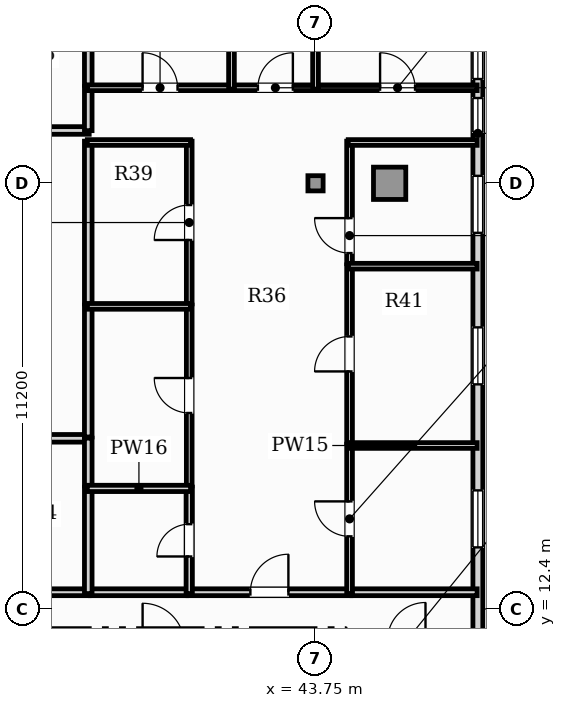
"""IFC4 building model, lengths in metres.
Left out: names, types, materials, properties, quantities, classifications, styles, units other than length and angle.
Written with IfcOpenShell. Run it as: python <this file> out.ifc"""

import sys

from ifc_helpers import new_model, si_unit, direction, frame, frame_2d, origin, origin_2d, place, context, subcontext, project, spatial, rectangle, hollow_rectangle, extrude, element, fill, save


model = new_model("IFC4")
c1 = context("Model", 3, precision=1e-05, world=origin(), true_north=direction((0.0, 1.0)))
c2 = subcontext(c1, "Body", "Model", "MODEL_VIEW")
j1 = project(units=[si_unit("LENGTHUNIT", "METRE"), si_unit("PLANEANGLEUNIT", "RADIAN")], contexts=[c1])
p1 = place(None, origin())
s1 = spatial("IfcSite", under=j1, at=p1, CompositionType="ELEMENT")
p2 = place(p1, origin())
s2 = spatial("IfcBuilding", under=s1, at=p2, CompositionType="ELEMENT")
p3 = place(p2, frame((0.0, 0.0, 337.5)))
s3 = spatial("IfcBuildingStorey", under=s2, at=p3, CompositionType="ELEMENT", Elevation=337.5)
p4 = place(p3, frame((45.7, 23.6, 0.0), z_axis=(0.0, 0.0, 1.0), x_axis=(1.0, 0.0, 0.0)))
e1 = element("IfcColumn", 1, at=p4, inside=s3, PredefinedType="USERDEFINED", context=c2, shape_type="SweptSolid", body=[
    extrude(hollow_rectangle(XDim=0.85, YDim=0.85, WallThickness=0.05, at=origin_2d()), origin(), (0.0, 0.0, 1.0), 3.85),
])
p5 = place(p3, frame((43.75, 23.6, 0.0), z_axis=(0.0, 0.0, 1.0), x_axis=(1.0, 0.0, 0.0)))
e2 = element("IfcColumn", 2, at=p5, inside=s3, PredefinedType="COLUMN", context=c2, shape_type="SweptSolid", body=[
    extrude(hollow_rectangle(XDim=0.4, YDim=0.4, WallThickness=0.02, at=origin_2d()), origin(), (0.0, 0.0, 1.0), 3.85),
])
p6 = place(p3, frame((48.021, 3.24, 0.0), z_axis=(0.0, 0.0, 1.0), x_axis=(0.0, 1.0, 0.0)))
e3 = element("IfcWall", 3, at=p6, inside=s3, PredefinedType="SOLIDWALL", context=c2, shape_type="SweptSolid", body=[
    extrude(rectangle(XDim=25.374, YDim=0.26, at=frame_2d((12.687, 0.0))), origin(), (0.0, 0.0, 1.0), 3.63),
])
p7 = place(p6, frame((21.704, 0.0, 0.95)))
e4 = element("IfcOpeningElement", 4, at=p7, cuts=e3, PredefinedType="OPENING", context=c2, shape_type="SweptSolid", body=[
    extrude(rectangle(XDim=0.9, YDim=1.5, at=frame_2d((0.45, 0.75))), frame((0.0, 0.14, 0.0), z_axis=(0.0, -1.0, 0.0), x_axis=(1.0, 0.0, 0.0)), (0.0, 0.0, 1.0), 0.28),
])
p8 = place(p6, frame((10.781, 0.0, 0.9)))
e5 = element("IfcOpeningElement", 5, at=p8, cuts=e3, PredefinedType="OPENING", context=c2, shape_type="SweptSolid", body=[
    extrude(rectangle(XDim=1.5, YDim=1.95, at=frame_2d((0.75, 0.975))), frame((0.0, 0.14, 0.0), z_axis=(0.0, -1.0, 0.0), x_axis=(1.0, 0.0, 0.0)), (0.0, 0.0, 1.0), 0.28),
])
p9 = place(p6, frame((15.07, 0.0, 0.9)))
e6 = element("IfcOpeningElement", 6, at=p9, cuts=e3, PredefinedType="OPENING", context=c2, shape_type="SweptSolid", body=[
    extrude(rectangle(XDim=1.5, YDim=1.95, at=frame_2d((0.75, 0.975))), frame((0.0, 0.14, 0.0), z_axis=(0.0, -1.0, 0.0), x_axis=(1.0, 0.0, 0.0)), (0.0, 0.0, 1.0), 0.28),
])
p10 = place(p6, frame((19.056, 0.0, 0.9)))
e7 = element("IfcOpeningElement", 7, at=p10, cuts=e3, PredefinedType="OPENING", context=c2, shape_type="SweptSolid", body=[
    extrude(rectangle(XDim=1.5, YDim=1.95, at=frame_2d((0.75, 0.975))), frame((0.0, 0.14, 0.0), z_axis=(0.0, -1.0, 0.0), x_axis=(1.0, 0.0, 0.0)), (0.0, 0.0, 1.0), 0.28),
])
p11 = place(p6, frame((23.104, 0.0, 0.9)))
e8 = element("IfcOpeningElement", 8, at=p11, cuts=e3, PredefinedType="OPENING", context=c2, shape_type="SweptSolid", body=[
    extrude(rectangle(XDim=1.5, YDim=1.95, at=frame_2d((0.75, 0.975))), frame((0.0, 0.14, 0.0), z_axis=(0.0, -1.0, 0.0), x_axis=(1.0, 0.0, 0.0)), (0.0, 0.0, 1.0), 0.28),
])
p12 = place(p3, frame((34.149, 12.84, 0.0), z_axis=(0.0, 0.0, 1.0), x_axis=(1.0, 0.0, 0.0)))
e9 = element("IfcWall", 9, at=p12, inside=s3, PredefinedType="PARTITIONING", context=c2, shape_type="SweptSolid", body=[
    extrude(rectangle(XDim=3.646, YDim=0.18, at=frame_2d((1.823, 0.0))), origin(), (0.0, 0.0, 1.0), 3.63),
])
p13 = place(p12, frame((1.323, 0.0, 0.0)))
e10 = element("IfcOpeningElement", 10, at=p13, cuts=e9, PredefinedType="OPENING", context=c2, shape_type="SweptSolid", body=[
    extrude(rectangle(XDim=1.0, YDim=2.15, at=frame_2d((0.5, 1.075))), frame((0.0, 0.1, 0.0), z_axis=(0.0, -1.0, 0.0), x_axis=(1.0, 0.0, 0.0)), (0.0, 0.0, 1.0), 0.2),
])
p14 = place(p3, frame((40.392, 12.84, 0.0), z_axis=(0.0, 0.0, 1.0), x_axis=(1.0, 0.0, 0.0)))
e11 = element("IfcWall", 11, at=p14, inside=s3, PredefinedType="PARTITIONING", context=c2, shape_type="SweptSolid", body=[
    extrude(rectangle(XDim=4.289, YDim=0.18, at=frame_2d((2.144, 0.0))), origin(), (0.0, 0.0, 1.0), 3.63),
])
p15 = place(p14, frame((1.644, 0.0, 0.0)))
e12 = element("IfcOpeningElement", 12, at=p15, cuts=e11, PredefinedType="OPENING", context=c2, shape_type="SweptSolid", body=[
    extrude(rectangle(XDim=1.0, YDim=2.15, at=frame_2d((0.5, 1.075))), frame((0.0, 0.1, 0.0), z_axis=(0.0, -1.0, 0.0), x_axis=(1.0, 0.0, 0.0)), (0.0, 0.0, 1.0), 0.2),
])
p16 = place(p3, frame((37.825, 12.84, 0.0), z_axis=(0.0, 0.0, 1.0), x_axis=(1.0, 0.0, 0.0)))
e13 = element("IfcWall", 13, at=p16, inside=s3, PredefinedType="PARTITIONING", context=c2, shape_type="SweptSolid", body=[
    extrude(rectangle(XDim=2.537, YDim=0.18, at=frame_2d((1.269, 0.0))), origin(), (0.0, 0.0, 1.0), 3.63),
])
p17 = place(p3, frame((44.71, 12.84, 0.0), z_axis=(0.0, 0.0, 1.0), x_axis=(1.0, 0.0, 0.0)))
e14 = element("IfcWall", 14, at=p17, inside=s3, PredefinedType="PARTITIONING", context=c2, shape_type="SweptSolid", body=[
    extrude(rectangle(XDim=3.292, YDim=0.18, at=frame_2d((1.646, 0.0))), origin(), (0.0, 0.0, 1.0), 3.63),
])
p18 = place(p3, frame((34.148, 16.89, 0.0), z_axis=(0.0, 0.0, 1.0), x_axis=(1.0, 0.0, 0.0)))
e15 = element("IfcWall", 15, at=p18, inside=s3, PredefinedType="PARTITIONING", context=c2, shape_type="SweptSolid", body=[
    extrude(rectangle(XDim=3.647, YDim=0.2, at=frame_2d((1.823, 0.0))), origin(), (0.0, 0.0, 1.0), 3.63),
])
p19 = place(p18, frame((1.364, 0.0, 0.0)))
e16 = element("IfcOpeningElement", 16, at=p19, cuts=e15, PredefinedType="OPENING", context=c2, shape_type="SweptSolid", body=[
    extrude(rectangle(XDim=0.92, YDim=2.1, at=frame_2d((0.46, 1.05))), frame((0.0, 0.11, 0.0), z_axis=(0.0, -1.0, 0.0), x_axis=(1.0, 0.0, 0.0)), (0.0, 0.0, 1.0), 0.22),
])
p20 = place(p3, frame((37.77, 12.805, 0.0), z_axis=(0.0, 0.0, 1.0), x_axis=(0.0, 1.0, 0.0)))
e17 = element("IfcWall", 17, at=p20, inside=s3, PredefinedType="PARTITIONING", context=c2, shape_type="SweptSolid", body=[
    extrude(rectangle(XDim=2.802, YDim=0.2, at=frame_2d((1.401, 0.0))), origin(), (0.0, 0.0, 1.0), 3.63),
])
p21 = place(p3, frame((37.77, 15.637, 0.0), z_axis=(0.0, 0.0, 1.0), x_axis=(0.0, 1.0, 0.0)))
e18 = element("IfcWall", 18, at=p21, inside=s3, PredefinedType="PARTITIONING", context=c2, shape_type="SweptSolid", body=[
    extrude(rectangle(XDim=1.258, YDim=0.2, at=frame_2d((0.629, 0.0))), origin(), (0.0, 0.0, 1.0), 3.63),
])
p22 = place(p3, frame((34.149, 24.99, 0.0), z_axis=(0.0, 0.0, 1.0), x_axis=(1.0, 0.0, 0.0)))
e19 = element("IfcWall", 19, at=p22, inside=s3, PredefinedType="PARTITIONING", context=c2, shape_type="SweptSolid", body=[
    extrude(rectangle(XDim=3.646, YDim=0.2, at=frame_2d((1.823, 0.0))), origin(), (0.0, 0.0, 1.0), 3.63),
])
p23 = place(p22, frame((0.816, 0.0, 0.0)))
e20 = element("IfcOpeningElement", 20, at=p23, cuts=e19, PredefinedType="OPENING", context=c2, shape_type="SweptSolid", body=[
    extrude(rectangle(XDim=0.92, YDim=2.1, at=frame_2d((0.46, 1.05))), frame((0.0, 0.11, 0.0), z_axis=(0.0, -1.0, 0.0), x_axis=(1.0, 0.0, 0.0)), (0.0, 0.0, 1.0), 0.22),
])
p24 = place(p3, frame((37.77, 16.925, 0.0), z_axis=(0.0, 0.0, 1.0), x_axis=(0.0, 1.0, 0.0)))
e21 = element("IfcWall", 21, at=p24, inside=s3, PredefinedType="PARTITIONING", context=c2, shape_type="SweptSolid", body=[
    extrude(rectangle(XDim=3.472, YDim=0.2, at=frame_2d((1.736, 0.0))), origin(), (0.0, 0.0, 1.0), 3.63),
])
p25 = place(p3, frame((37.77, 20.427, 0.0), z_axis=(0.0, 0.0, 1.0), x_axis=(0.0, 1.0, 0.0)))
e22 = element("IfcWall", 22, at=p25, inside=s3, PredefinedType="PARTITIONING", context=c2, shape_type="SweptSolid", body=[
    extrude(rectangle(XDim=4.282, YDim=0.2, at=frame_2d((2.141, 0.0))), origin(), (0.0, 0.0, 1.0), 3.63),
])
p26 = place(p3, frame((37.77, 24.985, 0.0), z_axis=(0.0, 0.0, 1.0), x_axis=(0.0, 1.0, 0.0)))
e23 = element("IfcWall", 23, at=p26, inside=s3, PredefinedType="PARTITIONING", context=c2, shape_type="SweptSolid", body=[
    extrude(rectangle(XDim=1.164, YDim=0.2, at=frame_2d((0.582, 0.0))), origin(), (0.0, 0.0, 1.0), 3.63),
])
p27 = place(p3, frame((37.77, 26.179, 0.0), z_axis=(0.0, 0.0, 1.0), x_axis=(0.0, 1.0, 0.0)))
e24 = element("IfcWall", 24, at=p27, inside=s3, PredefinedType="PARTITIONING", context=c2, shape_type="SweptSolid", body=[
    extrude(rectangle(XDim=5.526, YDim=0.2, at=frame_2d((2.763, 0.0))), origin(), (0.0, 0.0, 1.0), 3.63),
])
p28 = place(p3, frame((40.427, 12.805, 0.0), z_axis=(0.0, 0.0, 1.0), x_axis=(0.0, 1.0, 0.0)))
e25 = element("IfcWall", 25, at=p28, inside=s3, PredefinedType="PLUMBINGWALL", context=c2, shape_type="SweptSolid", body=[
    extrude(rectangle(XDim=2.802, YDim=0.165, at=frame_2d((1.401, 0.0))), origin(), (0.0, 0.0, 1.0), 3.63),
])
p29 = place(p28, frame((0.976, 0.0, 0.0)))
e26 = element("IfcOpeningElement", 26, at=p29, cuts=e25, PredefinedType="OPENING", context=c2, shape_type="SweptSolid", body=[
    extrude(rectangle(XDim=0.85, YDim=2.1, at=frame_2d((0.425, 1.05))), frame((0.0, 0.093, 0.0), z_axis=(0.0, -1.0, 0.0), x_axis=(1.0, 0.0, 0.0)), (0.0, 0.0, 1.0), 0.185),
])
p30 = place(p3, frame((40.427, 15.637, 0.0), z_axis=(0.0, 0.0, 1.0), x_axis=(0.0, 1.0, 0.0)))
e27 = element("IfcWall", 27, at=p30, inside=s3, PredefinedType="PARTITIONING", context=c2, shape_type="SweptSolid", body=[
    extrude(rectangle(XDim=4.76, YDim=0.15, at=frame_2d((2.38, 0.0))), origin(), (0.0, 0.0, 1.0), 3.63),
])
p31 = place(p30, frame((1.92, 0.0, 0.0)))
e28 = element("IfcOpeningElement", 28, at=p31, cuts=e27, PredefinedType="OPENING", context=c2, shape_type="SweptSolid", body=[
    extrude(rectangle(XDim=0.92, YDim=2.1, at=frame_2d((0.46, 1.05))), frame((0.0, 0.085, 0.0), z_axis=(0.0, -1.0, 0.0), x_axis=(1.0, 0.0, 0.0)), (0.0, 0.0, 1.0), 0.17),
])
p32 = place(p3, frame((40.427, 20.427, 0.0), z_axis=(0.0, 0.0, 1.0), x_axis=(0.0, 1.0, 0.0)))
e29 = element("IfcWall", 29, at=p32, inside=s3, PredefinedType="PARTITIONING", context=c2, shape_type="SweptSolid", body=[
    extrude(rectangle(XDim=4.282, YDim=0.15, at=frame_2d((2.141, 0.0))), origin(), (0.0, 0.0, 1.0), 3.63),
])
p33 = place(p32, frame((1.681, 0.0, 0.0)))
e30 = element("IfcOpeningElement", 30, at=p33, cuts=e29, PredefinedType="OPENING", context=c2, shape_type="SweptSolid", body=[
    extrude(rectangle(XDim=0.92, YDim=2.1, at=frame_2d((0.46, 1.05))), frame((0.0, 0.085, 0.0), z_axis=(0.0, -1.0, 0.0), x_axis=(1.0, 0.0, 0.0)), (0.0, 0.0, 1.0), 0.17),
])
p34 = place(p3, frame((37.745, 24.674, 0.0), z_axis=(0.0, 0.0, 1.0), x_axis=(1.0, 0.0, 0.0)))
e31 = element("IfcWall", 31, at=p34, inside=s3, PredefinedType="PARTITIONING", context=c2, shape_type="SweptSolid", body=[
    extrude(rectangle(XDim=2.717, YDim=0.15, at=frame_2d((1.358, 0.0))), origin(), (0.0, 0.0, 1.0), 3.63),
])
p35 = place(p3, frame((44.646, 12.805, 0.0), z_axis=(0.0, 0.0, 1.0), x_axis=(0.0, 1.0, 0.0)))
e32 = element("IfcWall", 32, at=p35, inside=s3, PredefinedType="PARTITIONING", context=c2, shape_type="SweptSolid", body=[
    extrude(rectangle(XDim=3.931, YDim=0.15, at=frame_2d((1.965, 0.0))), origin(), (0.0, 0.0, 1.0), 3.63),
])
p36 = place(p35, frame((1.506, 0.0, 0.0)))
e33 = element("IfcOpeningElement", 33, at=p36, cuts=e32, PredefinedType="OPENING", context=c2, shape_type="SweptSolid", body=[
    extrude(rectangle(XDim=0.92, YDim=2.1, at=frame_2d((0.46, 1.05))), frame((0.0, 0.085, 0.0), z_axis=(0.0, -1.0, 0.0), x_axis=(1.0, 0.0, 0.0)), (0.0, 0.0, 1.0), 0.17),
])
p37 = place(p3, frame((44.646, 16.766, 0.0), z_axis=(0.0, 0.0, 1.0), x_axis=(0.0, 1.0, 0.0)))
e34 = element("IfcWall", 34, at=p37, inside=s3, PredefinedType="PARTITIONING", context=c2, shape_type="SweptSolid", body=[
    extrude(rectangle(XDim=4.688, YDim=0.15, at=frame_2d((2.344, 0.0))), origin(), (0.0, 0.0, 1.0), 3.63),
])
p38 = place(p37, frame((1.884, 0.0, 0.0)))
e35 = element("IfcOpeningElement", 35, at=p38, cuts=e34, PredefinedType="OPENING", context=c2, shape_type="SweptSolid", body=[
    extrude(rectangle(XDim=0.92, YDim=2.1, at=frame_2d((0.46, 1.05))), frame((0.0, 0.085, 0.0), z_axis=(0.0, -1.0, 0.0), x_axis=(1.0, 0.0, 0.0)), (0.0, 0.0, 1.0), 0.17),
])
p39 = place(p3, frame((44.646, 21.484, 0.0), z_axis=(0.0, 0.0, 1.0), x_axis=(0.0, 1.0, 0.0)))
e36 = element("IfcWall", 36, at=p39, inside=s3, PredefinedType="PARTITIONING", context=c2, shape_type="SweptSolid", body=[
    extrude(rectangle(XDim=3.225, YDim=0.15, at=frame_2d((1.612, 0.0))), origin(), (0.0, 0.0, 1.0), 3.63),
])
p40 = place(p39, frame((0.28, 0.0, 0.0)))
e37 = element("IfcOpeningElement", 37, at=p40, cuts=e36, PredefinedType="OPENING", context=c2, shape_type="SweptSolid", body=[
    extrude(rectangle(XDim=0.92, YDim=2.1, at=frame_2d((0.46, 1.05))), frame((0.0, 0.085, 0.0), z_axis=(0.0, -1.0, 0.0), x_axis=(1.0, 0.0, 0.0)), (0.0, 0.0, 1.0), 0.17),
])
p41 = place(p3, frame((44.61, 24.674, 0.0), z_axis=(0.0, 0.0, 1.0), x_axis=(1.0, 0.0, 0.0)))
e38 = element("IfcWall", 38, at=p41, inside=s3, PredefinedType="PARTITIONING", context=c2, shape_type="SweptSolid", body=[
    extrude(rectangle(XDim=3.392, YDim=0.15, at=frame_2d((1.696, 0.0))), origin(), (0.0, 0.0, 1.0), 3.63),
])
p42 = place(p3, frame((37.745, 26.114, 0.0), z_axis=(0.0, 0.0, 1.0), x_axis=(1.0, 0.0, 0.0)))
e39 = element("IfcWall", 39, at=p42, inside=s3, PredefinedType="PARTITIONING", context=c2, shape_type="SweptSolid", body=[
    extrude(rectangle(XDim=3.828, YDim=0.15, at=frame_2d((1.914, 0.0))), origin(), (0.0, 0.0, 1.0), 3.63),
])
p43 = place(p42, frame((1.454, 0.0, 0.0)))
e40 = element("IfcOpeningElement", 40, at=p43, cuts=e39, PredefinedType="OPENING", context=c2, shape_type="SweptSolid", body=[
    extrude(rectangle(XDim=0.92, YDim=2.1, at=frame_2d((0.46, 1.05))), frame((0.0, 0.085, 0.0), z_axis=(0.0, -1.0, 0.0), x_axis=(1.0, 0.0, 0.0)), (0.0, 0.0, 1.0), 0.17),
])
p44 = place(p3, frame((41.603, 26.114, 0.0), z_axis=(0.0, 0.0, 1.0), x_axis=(1.0, 0.0, 0.0)))
e41 = element("IfcWall", 41, at=p44, inside=s3, PredefinedType="PARTITIONING", context=c2, shape_type="SweptSolid", body=[
    extrude(rectangle(XDim=2.182, YDim=0.15, at=frame_2d((1.091, 0.0))), origin(), (0.0, 0.0, 1.0), 3.63),
])
p45 = place(p44, frame((0.631, 0.0, 0.0)))
e42 = element("IfcOpeningElement", 42, at=p45, cuts=e41, PredefinedType="OPENING", context=c2, shape_type="SweptSolid", body=[
    extrude(rectangle(XDim=0.92, YDim=2.1, at=frame_2d((0.46, 1.05))), frame((0.0, 0.085, 0.0), z_axis=(0.0, -1.0, 0.0), x_axis=(1.0, 0.0, 0.0)), (0.0, 0.0, 1.0), 0.17),
])
p46 = place(p3, frame((43.815, 26.114, 0.0), z_axis=(0.0, 0.0, 1.0), x_axis=(1.0, 0.0, 0.0)))
e43 = element("IfcWall", 43, at=p46, inside=s3, PredefinedType="PARTITIONING", context=c2, shape_type="SweptSolid", body=[
    extrude(rectangle(XDim=4.187, YDim=0.15, at=frame_2d((2.094, 0.0))), origin(), (0.0, 0.0, 1.0), 3.63),
])
p47 = place(p46, frame((1.634, 0.0, 0.0)))
e44 = element("IfcOpeningElement", 44, at=p47, cuts=e43, PredefinedType="OPENING", context=c2, shape_type="SweptSolid", body=[
    extrude(rectangle(XDim=0.92, YDim=2.1, at=frame_2d((0.46, 1.05))), frame((0.0, 0.085, 0.0), z_axis=(0.0, -1.0, 0.0), x_axis=(1.0, 0.0, 0.0)), (0.0, 0.0, 1.0), 0.17),
])
p48 = place(p3, frame((37.745, 15.572, 0.0), z_axis=(0.0, 0.0, 1.0), x_axis=(1.0, 0.0, 0.0)))
e45 = element("IfcWall", 45, at=p48, inside=s3, PredefinedType="PLUMBINGWALL", context=c2, shape_type="SweptSolid", body=[
    extrude(rectangle(XDim=2.717, YDim=0.165, at=frame_2d((1.358, 0.0))), origin(), (0.0, 0.0, 1.0), 3.63),
])
p49 = place(p3, frame((37.745, 20.362, 0.0), z_axis=(0.0, 0.0, 1.0), x_axis=(1.0, 0.0, 0.0)))
e46 = element("IfcWall", 46, at=p49, inside=s3, PredefinedType="PARTITIONING", context=c2, shape_type="SweptSolid", body=[
    extrude(rectangle(XDim=2.717, YDim=0.15, at=frame_2d((1.358, 0.0))), origin(), (0.0, 0.0, 1.0), 3.63),
])
for number, where, z_axis, x_axis in (
    (47, (44.61, 16.701, 0.0), (0.0, 0.0, 1.0), (1.0, 0.0, 0.0)),
    (48, (44.61, 21.419, 0.0), (0.0, 0.0, 1.0), (1.0, 0.0, 0.0)),
):
    element("IfcWall", number, at=place(p3, frame(where, z_axis=z_axis, x_axis=x_axis)), inside=s3, PredefinedType="PARTITIONING", context=c2, shape_type="SweptSolid", body=[
        extrude(rectangle(XDim=3.392, YDim=0.15, at=frame_2d((1.696, 0.0))), origin(), (0.0, 0.0, 1.0), 3.63),
    ])
p50 = place(p3, frame((41.538, 26.079, 0.0), z_axis=(0.0, 0.0, 1.0), x_axis=(0.0, 1.0, 0.0)))
e49 = element("IfcWall", 49, at=p50, inside=s3, PredefinedType="PARTITIONING", context=c2, shape_type="SweptSolid", body=[
    extrude(rectangle(XDim=5.625, YDim=0.15, at=frame_2d((2.813, 0.0))), origin(), (0.0, 0.0, 1.0), 3.63),
])
p51 = place(p3, frame((43.75, 26.079, 0.0), z_axis=(0.0, 0.0, 1.0), x_axis=(0.0, 1.0, 0.0)))
e50 = element("IfcWall", 50, at=p51, inside=s3, PredefinedType="PARTITIONING", context=c2, shape_type="SweptSolid", body=[
    extrude(rectangle(XDim=5.625, YDim=0.15, at=frame_2d((2.813, 0.0))), origin(), (0.0, 0.0, 1.0), 3.327),
])
p52 = place(p7, origin())
e51 = element("IfcWindow", 51, at=p52, inside=s3, PartitioningType="SINGLE_PANEL", PredefinedType="WINDOW", context=c2, shape_type="SweptSolid", body=[
    extrude(rectangle(XDim=0.9, YDim=1.5, at=frame_2d((0.45, 0.75))), frame((0.0, 0.03, 0.0), z_axis=(0.0, -1.0, 0.0), x_axis=(1.0, 0.0, 0.0)), (0.0, 0.0, 1.0), 0.06),
])
fill(e4, e51)
p53 = place(p8, origin())
e52 = element("IfcWindow", 52, at=p53, inside=s3, PartitioningType="SINGLE_PANEL", PredefinedType="WINDOW", context=c2, shape_type="SweptSolid", body=[
    extrude(rectangle(XDim=1.5, YDim=1.95, at=frame_2d((0.75, 0.975))), frame((0.0, 0.03, 0.0), z_axis=(0.0, -1.0, 0.0), x_axis=(1.0, 0.0, 0.0)), (0.0, 0.0, 1.0), 0.06),
])
fill(e5, e52)
p54 = place(p9, origin())
e53 = element("IfcWindow", 53, at=p54, inside=s3, PartitioningType="SINGLE_PANEL", PredefinedType="WINDOW", context=c2, shape_type="SweptSolid", body=[
    extrude(rectangle(XDim=1.5, YDim=1.95, at=frame_2d((0.75, 0.975))), frame((0.0, 0.03, 0.0), z_axis=(0.0, -1.0, 0.0), x_axis=(1.0, 0.0, 0.0)), (0.0, 0.0, 1.0), 0.06),
])
fill(e6, e53)
p55 = place(p10, origin())
e54 = element("IfcWindow", 54, at=p55, inside=s3, PartitioningType="SINGLE_PANEL", PredefinedType="WINDOW", context=c2, shape_type="SweptSolid", body=[
    extrude(rectangle(XDim=1.5, YDim=1.95, at=frame_2d((0.75, 0.975))), frame((0.0, 0.03, 0.0), z_axis=(0.0, -1.0, 0.0), x_axis=(1.0, 0.0, 0.0)), (0.0, 0.0, 1.0), 0.06),
])
fill(e7, e54)
p56 = place(p11, origin())
e55 = element("IfcWindow", 55, at=p56, inside=s3, PartitioningType="SINGLE_PANEL", PredefinedType="WINDOW", context=c2, shape_type="SweptSolid", body=[
    extrude(rectangle(XDim=1.5, YDim=1.95, at=frame_2d((0.75, 0.975))), frame((0.0, 0.03, 0.0), z_axis=(0.0, -1.0, 0.0), x_axis=(1.0, 0.0, 0.0)), (0.0, 0.0, 1.0), 0.06),
])
fill(e8, e55)
p57 = place(p15, origin())
e56 = element("IfcDoor", 56, at=p57, inside=s3, OperationType="SINGLE_SWING_RIGHT", PredefinedType="DOOR", context=c2, shape_type="SweptSolid", body=[
    extrude(rectangle(XDim=1.0, YDim=2.15, at=frame_2d((0.5, 1.075))), frame((0.0, 0.025, 0.0), z_axis=(0.0, -1.0, 0.0), x_axis=(1.0, 0.0, 0.0)), (0.0, 0.0, 1.0), 0.05),
])
fill(e12, e56)
p58 = place(p29, origin())
e57 = element("IfcDoor", 57, at=p58, inside=s3, OperationType="SINGLE_SWING_LEFT", PredefinedType="DOOR", context=c2, shape_type="SweptSolid", body=[
    extrude(rectangle(XDim=0.85, YDim=2.1, at=frame_2d((0.425, 1.05))), frame((0.0, 0.025, 0.0), z_axis=(0.0, -1.0, 0.0), x_axis=(1.0, 0.0, 0.0)), (0.0, 0.0, 1.0), 0.05),
])
fill(e26, e57)
p59 = place(p31, origin())
e58 = element("IfcDoor", 58, at=p59, inside=s3, OperationType="SINGLE_SWING_RIGHT", PredefinedType="DOOR", context=c2, shape_type="SweptSolid", body=[
    extrude(rectangle(XDim=0.92, YDim=2.1, at=frame_2d((0.46, 1.05))), frame((0.0, 0.025, 0.0), z_axis=(0.0, -1.0, 0.0), x_axis=(1.0, 0.0, 0.0)), (0.0, 0.0, 1.0), 0.05),
])
fill(e28, e58)
p60 = place(p33, origin())
e59 = element("IfcDoor", 59, at=p60, inside=s3, OperationType="SINGLE_SWING_LEFT", PredefinedType="DOOR", context=c2, shape_type="SweptSolid", body=[
    extrude(rectangle(XDim=0.92, YDim=2.1, at=frame_2d((0.46, 1.05))), frame((0.0, 0.025, 0.0), z_axis=(0.0, -1.0, 0.0), x_axis=(1.0, 0.0, 0.0)), (0.0, 0.0, 1.0), 0.05),
])
fill(e30, e59)
p61 = place(p36, origin())
e60 = element("IfcDoor", 60, at=p61, inside=s3, OperationType="SINGLE_SWING_RIGHT", PredefinedType="DOOR", context=c2, shape_type="SweptSolid", body=[
    extrude(rectangle(XDim=0.92, YDim=2.1, at=frame_2d((0.46, 1.05))), frame((0.0, 0.025, 0.0), z_axis=(0.0, -1.0, 0.0), x_axis=(1.0, 0.0, 0.0)), (0.0, 0.0, 1.0), 0.05),
])
fill(e33, e60)
p62 = place(p38, origin())
e61 = element("IfcDoor", 61, at=p62, inside=s3, OperationType="SINGLE_SWING_LEFT", PredefinedType="DOOR", context=c2, shape_type="SweptSolid", body=[
    extrude(rectangle(XDim=0.92, YDim=2.1, at=frame_2d((0.46, 1.05))), frame((0.0, 0.025, 0.0), z_axis=(0.0, -1.0, 0.0), x_axis=(1.0, 0.0, 0.0)), (0.0, 0.0, 1.0), 0.05),
])
fill(e35, e61)
p63 = place(p40, origin())
e62 = element("IfcDoor", 62, at=p63, inside=s3, OperationType="SINGLE_SWING_RIGHT", PredefinedType="DOOR", context=c2, shape_type="SweptSolid", body=[
    extrude(rectangle(XDim=0.92, YDim=2.1, at=frame_2d((0.46, 1.05))), frame((0.0, 0.025, 0.0), z_axis=(0.0, -1.0, 0.0), x_axis=(1.0, 0.0, 0.0)), (0.0, 0.0, 1.0), 0.05),
])
fill(e37, e62)
p64 = place(p43, origin())
e63 = element("IfcDoor", 63, at=p64, inside=s3, OperationType="SINGLE_SWING_LEFT", PredefinedType="DOOR", context=c2, shape_type="SweptSolid", body=[
    extrude(rectangle(XDim=0.92, YDim=2.1, at=frame_2d((0.46, 1.05))), frame((0.0, 0.025, 0.0), z_axis=(0.0, -1.0, 0.0), x_axis=(1.0, 0.0, 0.0)), (0.0, 0.0, 1.0), 0.05),
])
fill(e40, e63)
p65 = place(p45, origin())
e64 = element("IfcDoor", 64, at=p65, inside=s3, OperationType="SINGLE_SWING_RIGHT", PredefinedType="DOOR", context=c2, shape_type="SweptSolid", body=[
    extrude(rectangle(XDim=0.92, YDim=2.1, at=frame_2d((0.46, 1.05))), frame((0.0, 0.025, 0.0), z_axis=(0.0, -1.0, 0.0), x_axis=(1.0, 0.0, 0.0)), (0.0, 0.0, 1.0), 0.05),
])
fill(e42, e64)
p66 = place(p47, origin())
e65 = element("IfcDoor", 65, at=p66, inside=s3, OperationType="SINGLE_SWING_LEFT", PredefinedType="DOOR", context=c2, shape_type="SweptSolid", body=[
    extrude(rectangle(XDim=0.92, YDim=2.1, at=frame_2d((0.46, 1.05))), frame((0.0, 0.025, 0.0), z_axis=(0.0, -1.0, 0.0), x_axis=(1.0, 0.0, 0.0)), (0.0, 0.0, 1.0), 0.05),
])
fill(e44, e65)
save(model, sys.argv[1])
